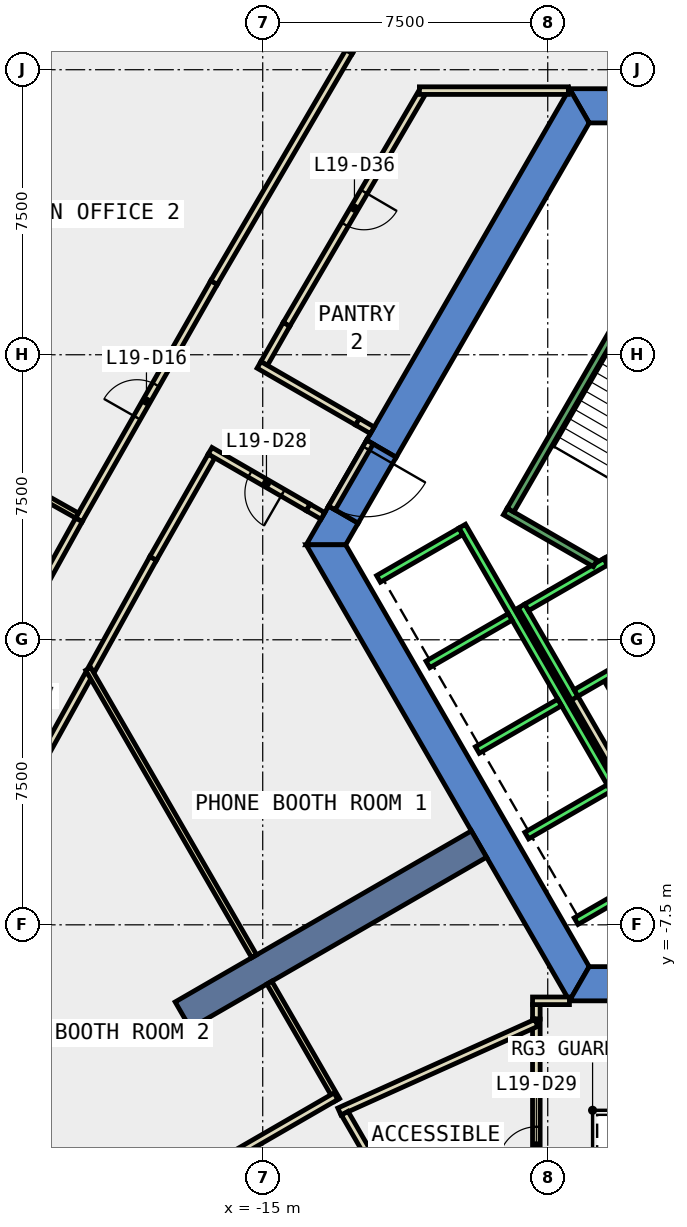
"""IFC4 building model, lengths in metres.
Left out: names, types, materials, properties, quantities, classifications, styles, units other than length and angle.
Written with IfcOpenShell. Run it as: python <this file> out.ifc"""

import sys

from ifc_helpers import new_model, si_unit, direction, frame, frame_2d, origin, place, context, subcontext, project, spatial, polyline, rectangle, outline, extrude, element, fill, save


model = new_model("IFC4")
c1 = context("Model", 3, precision=1e-05, world=origin(), true_north=direction((0.0, 1.0)))
c2 = subcontext(c1, "Body", "Model", "MODEL_VIEW")
j1 = project(units=[si_unit("LENGTHUNIT", "METRE"), si_unit("PLANEANGLEUNIT", "RADIAN")], contexts=[c1])
p1 = place(None, origin())
s1 = spatial("IfcSite", under=j1, at=p1, CompositionType="ELEMENT")
p2 = place(p1, origin())
s2 = spatial("IfcBuilding", under=s1, at=p2, CompositionType="ELEMENT")
p3 = place(p2, frame((0.0, 0.0, 90.8)))
s3 = spatial("IfcBuildingStorey", under=s2, at=p3, CompositionType="ELEMENT", Elevation=90.8)
p4 = place(p3, frame((0.0, 0.0, -0.4)))
e1 = element("IfcWall", 1, at=p4, inside=s3, PredefinedType="SHEAR", context=c2, shape_type="SweptSolid", body=[
    extrude(outline(polyline([(-4.55, 13.6), (-4.55, 14.5), (-6.928, 14.5), (-6.409, 13.6), (-4.55, 13.6)])), origin(), (0.0, 0.0, 1.0), 4.2),
])
p5 = place(p3, frame((0.0, 0.0, -0.4)))
e2 = element("IfcWall", 2, at=p5, inside=s3, PredefinedType="SHEAR", context=c2, shape_type="SweptSolid", body=[
    extrude(outline(polyline([(-12.267, 5.252), (-11.488, 4.802), (-6.409, 13.6), (-6.928, 14.5), (-12.267, 5.252)])), origin(), (0.0, 0.0, 1.0), 4.2),
])
p6 = place(p3, frame((0.0, 0.0, -0.4)))
e3 = element("IfcWall", 3, at=p6, inside=s3, PredefinedType="SHEAR", context=c2, shape_type="SweptSolid", body=[
    extrude(outline(polyline([(-12.488, 3.07), (-13.267, 3.52), (-13.856, 2.5), (-12.817, 2.5), (-12.488, 3.07)])), origin(), (0.0, 0.0, 1.0), 4.2),
])
p7 = place(p3, frame((0.0, 0.0, 3.6)))
e4 = element("IfcWall", 4, at=p7, inside=s3, PredefinedType="SHEAR", context=c2, shape_type="SweptSolid", body=[
    extrude(outline(polyline([(-13.267, 3.52), (-12.488, 3.07), (-11.488, 4.802), (-12.267, 5.252), (-13.267, 3.52)])), origin(), (0.0, 0.0, 1.0), 0.2),
])
p8 = place(p3, frame((0.0, 0.0, -0.4)))
e5 = element("IfcWall", 5, at=p8, inside=s3, PredefinedType="SHEAR", context=c2, shape_type="SweptSolid", body=[
    extrude(outline(polyline([(-13.856, 2.5), (-6.928, -9.5), (-6.409, -8.6), (-12.817, 2.5), (-13.856, 2.5)])), origin(), (0.0, 0.0, 1.0), 4.2),
])
p9 = place(p3, frame((0.0, 0.0, -0.4)))
e6 = element("IfcWall", 6, at=p9, inside=s3, PredefinedType="SHEAR", context=c2, shape_type="SweptSolid", body=[
    extrude(outline(polyline([(3.75, -9.5), (3.75, -8.6), (-6.409, -8.6), (-6.928, -9.5), (3.75, -9.5)])), origin(), (0.0, 0.0, 1.0), 4.2),
])
p10 = place(p3, frame((-9.31, -5.375, -0.4), z_axis=(0.0, 0.0, 1.0), x_axis=(-0.866017533419, -0.500013631625, 0.0)))
e7 = element("IfcWall", 7, at=p10, inside=s3, PredefinedType="SHEAR", context=c2, shape_type="SweptSolid", body=[
    extrude(rectangle(XDim=9.0, YDim=0.8, at=frame_2d((4.5, 0.0))), origin(), (0.0, 0.0, 1.0), 4.2),
])
p11 = place(p3, frame((-19.289, 18.813, 0.0), z_axis=(0.0, 0.0, 1.0), x_axis=(-0.504998117261, -0.863120444413, 0.0)))
e8 = element("IfcWall", 8, at=p11, inside=s3, PredefinedType="STANDARD", context=c2, shape_type="SweptSolid", body=[
    extrude(rectangle(XDim=6.099, YDim=0.3, at=frame_2d((3.049, 0.0))), origin(), (0.0, 0.0, 1.0), 3.8),
])
p12 = place(p11, frame((0.525, 0.0, 0.9)))
e9 = element("IfcOpeningElement", 9, at=p12, cuts=e8, PredefinedType="OPENING", context=c2, shape_type="SweptSolid", body=[
    extrude(rectangle(XDim=2.0, YDim=2.6, at=frame_2d((1.0, 1.3))), frame((0.0, 0.16, 0.0), z_axis=(0.0, -1.0, 0.0), x_axis=(1.0, 0.0, 0.0)), (0.0, 0.0, 1.0), 0.32),
])
p13 = place(p11, frame((3.574, 0.0, 0.9)))
e10 = element("IfcOpeningElement", 10, at=p13, cuts=e8, PredefinedType="OPENING", context=c2, shape_type="SweptSolid", body=[
    extrude(rectangle(XDim=2.0, YDim=2.6, at=frame_2d((1.0, 1.3))), frame((0.0, 0.16, 0.0), z_axis=(0.0, -1.0, 0.0), x_axis=(1.0, 0.0, 0.0)), (0.0, 0.0, 1.0), 0.32),
])
p14 = place(p3, frame((-10.797, 14.415, 0.0), z_axis=(0.0, 0.0, 1.0), x_axis=(-0.505008297342, -0.863114488128, 0.0)))
e11 = element("IfcWall", 11, at=p14, inside=s3, PredefinedType="PARTITIONING", context=c2, shape_type="SweptSolid", body=[
    extrude(rectangle(XDim=7.085, YDim=0.2, at=frame_2d((3.542, 0.0))), origin(), (0.0, 0.0, 1.0), 3.8),
])
p15 = place(p14, frame((3.043, 0.0, 0.0)))
e12 = element("IfcOpeningElement", 12, at=p15, cuts=e11, PredefinedType="OPENING", context=c2, shape_type="SweptSolid", body=[
    extrude(rectangle(XDim=1.0, YDim=2.1, at=frame_2d((0.5, 1.05))), frame((0.0, 0.11, 0.0), z_axis=(0.0, -1.0, 0.0), x_axis=(1.0, 0.0, 0.0)), (0.0, 0.0, 1.0), 0.22),
])
p16 = place(p3, frame((-14.375, 8.3, 0.0), z_axis=(0.0, 0.0, 1.0), x_axis=(-0.495074026382, -0.868850797549, 0.0)))
e13 = element("IfcWall", 13, at=p16, inside=s3, PredefinedType="PARTITIONING", context=c2, shape_type="SweptSolid", body=[
    extrude(rectangle(XDim=1.186, YDim=0.2, at=frame_2d((0.593, 0.0))), origin(), (0.0, 0.0, 1.0), 3.8),
])
p17 = place(p3, frame((-15.098, 7.233, 0.0), z_axis=(0.0, 0.0, 1.0), x_axis=(0.866101363304, -0.499868411168, 0.0)))
e14 = element("IfcWall", 14, at=p17, inside=s3, PredefinedType="PARTITIONING", context=c2, shape_type="SweptSolid", body=[
    extrude(rectangle(XDim=2.992, YDim=0.2, at=frame_2d((1.496, 0.0))), origin(), (0.0, 0.0, 1.0), 3.8),
])
p18 = place(p3, frame((-17.883, 2.143, 0.0), z_axis=(0.0, 0.0, 1.0), x_axis=(-0.484695523805, -0.874682942101, 0.0)))
e15 = element("IfcWall", 15, at=p18, inside=s3, PredefinedType="PARTITIONING", context=c2, shape_type="SweptSolid", body=[
    extrude(rectangle(XDim=3.349, YDim=0.2, at=frame_2d((1.674, 0.0))), origin(), (0.0, 0.0, 1.0), 3.8),
])
p19 = place(p3, frame((-13.417, 3.26, 0.0), z_axis=(0.0, 0.0, 1.0), x_axis=(-0.866032067792, 0.499988457423, 0.0)))
e16 = element("IfcWall", 16, at=p19, inside=s3, PredefinedType="PARTITIONING", context=c2, shape_type="SweptSolid", body=[
    extrude(rectangle(XDim=0.45, YDim=0.2, at=frame_2d((0.225, 0.0))), origin(), (0.0, 0.0, 1.0), 2.4),
])
p20 = place(p3, frame((-16.348, 4.837, 0.0), z_axis=(0.0, 0.0, 1.0), x_axis=(-0.495121026513, -0.868824015037, 0.0)))
e17 = element("IfcWall", 17, at=p20, inside=s3, PredefinedType="PARTITIONING", context=c2, shape_type="SweptSolid", body=[
    extrude(rectangle(XDim=3.101, YDim=0.2, at=frame_2d((1.55, 0.0))), origin(), (0.0, 0.0, 1.0), 3.8),
])
p21 = place(p3, frame((-19.579, -0.917, 0.0), z_axis=(0.0, 0.0, 1.0), x_axis=(-0.484700239797, -0.874680328772, 0.0)))
e18 = element("IfcWall", 18, at=p21, inside=s3, PredefinedType="PARTITIONING", context=c2, shape_type="SweptSolid", body=[
    extrude(rectangle(XDim=3.585, YDim=0.2, at=frame_2d((1.792, 0.0))), origin(), (0.0, 0.0, 1.0), 3.8),
])
p22 = place(p3, frame((-12.728, 15.473, 0.0), z_axis=(0.0, 0.0, 1.0), x_axis=(0.515010673306, 0.857183764651, 0.0)))
e19 = element("IfcWall", 19, at=p22, inside=s3, PredefinedType="PARTITIONING", context=c2, shape_type="SweptSolid", body=[
    extrude(rectangle(XDim=7.111, YDim=0.2, at=frame_2d((3.555, 0.0))), origin(), (0.0, 0.0, 1.0), 3.8),
])
p23 = place(p22, frame((3.13, 0.0, 0.0)))
e20 = element("IfcOpeningElement", 20, at=p23, cuts=e19, PredefinedType="OPENING", context=c2, shape_type="SweptSolid", body=[
    extrude(rectangle(XDim=1.0, YDim=2.1, at=frame_2d((0.5, 1.05))), frame((0.0, 0.11, 0.0), z_axis=(0.0, -1.0, 0.0), x_axis=(1.0, 0.0, 0.0)), (0.0, 0.0, 1.0), 0.22),
])
p24 = place(p3, frame((-19.838, 3.156, 0.0), z_axis=(0.0, 0.0, 1.0), x_axis=(0.494978648769, 0.868905137091, 0.0)))
e21 = element("IfcWall", 21, at=p24, inside=s3, PredefinedType="PARTITIONING", context=c2, shape_type="SweptSolid", body=[
    extrude(rectangle(XDim=7.186, YDim=0.2, at=frame_2d((3.593, 0.0))), origin(), (0.0, 0.0, 1.0), 3.8),
])
p25 = place(p24, frame((3.093, 0.0, 0.0)))
e22 = element("IfcOpeningElement", 22, at=p25, cuts=e21, PredefinedType="OPENING", context=c2, shape_type="SweptSolid", body=[
    extrude(rectangle(XDim=1.0, YDim=2.1, at=frame_2d((0.5, 1.05))), frame((0.0, 0.11, 0.0), z_axis=(0.0, -1.0, 0.0), x_axis=(1.0, 0.0, 0.0)), (0.0, 0.0, 1.0), 0.22),
])
p26 = place(p3, frame((-16.281, 9.4, 0.0), z_axis=(0.0, 0.0, 1.0), x_axis=(0.504973069247, 0.863135099121, 0.0)))
e23 = element("IfcWall", 23, at=p26, inside=s3, PredefinedType="PARTITIONING", context=c2, shape_type="SweptSolid", body=[
    extrude(rectangle(XDim=7.036, YDim=0.2, at=frame_2d((3.518, 0.0))), origin(), (0.0, 0.0, 1.0), 3.8),
])
p27 = place(p3, frame((-23.284, -3.064, 0.0), z_axis=(0.0, 0.0, 1.0), x_axis=(0.48478560119, 0.874633020689, 0.0)))
e24 = element("IfcWall", 24, at=p27, inside=s3, PredefinedType="PARTITIONING", context=c2, shape_type="SweptSolid", body=[
    extrude(rectangle(XDim=7.11, YDim=0.2, at=frame_2d((3.555, 0.0))), origin(), (0.0, 0.0, 1.0), 3.8),
])
p28 = place(p27, frame((3.13, 0.0, 0.0)))
e25 = element("IfcOpeningElement", 25, at=p28, cuts=e24, PredefinedType="OPENING", context=c2, shape_type="SweptSolid", body=[
    extrude(rectangle(XDim=1.0, YDim=2.1, at=frame_2d((0.5, 1.05))), frame((0.0, 0.11, 0.0), z_axis=(0.0, -1.0, 0.0), x_axis=(1.0, 0.0, 0.0)), (0.0, 0.0, 1.0), 0.22),
])
p29 = place(p3, frame((-5.126, -2.422, 0.0), z_axis=(0.0, 0.0, 1.0), x_axis=(-0.500062241894, 0.865989465428, 0.0)))
e26 = element("IfcWall", 26, at=p29, inside=s3, PredefinedType="PARTITIONING", context=c2, shape_type="SweptSolid", body=[
    extrude(rectangle(XDim=1.7, YDim=0.2, at=frame_2d((0.85, 0.0))), origin(), (0.0, 0.0, 1.0), 3.8),
])
p30 = place(p3, frame((-5.492, -3.788, 0.0), z_axis=(0.0, 0.0, 1.0), x_axis=(-0.500008949224, 0.866020236886, 0.0)))
e27 = element("IfcWall", 27, at=p30, inside=s3, PredefinedType="PARTITIONING", context=c2, shape_type="SweptSolid", body=[
    extrude(rectangle(XDim=2.68, YDim=0.2, at=frame_2d((1.34, 0.0))), origin(), (0.0, 0.0, 1.0), 3.8),
])
p31 = place(p3, frame((-7.8, -9.98, 0.0), z_axis=(0.0, 0.0, 1.0), x_axis=(0.0, 1.0, 0.0)))
e28 = element("IfcWall", 28, at=p31, inside=s3, PredefinedType="PARTITIONING", context=c2, shape_type="SweptSolid", body=[
    extrude(rectangle(XDim=0.381, YDim=0.2, at=frame_2d((0.19, 0.0))), origin(), (0.0, 0.0, 1.0), 3.8),
])
p32 = place(p3, frame((-7.9, -9.499, 0.0), z_axis=(0.0, 0.0, 1.0), x_axis=(1.0, 0.0, 0.0)))
e29 = element("IfcWall", 29, at=p32, inside=s3, PredefinedType="PARTITIONING", context=c2, shape_type="SweptSolid", body=[
    extrude(rectangle(XDim=0.971, YDim=0.2, at=frame_2d((0.485, 0.0))), origin(), (0.0, 0.0, 1.0), 3.8),
])
p33 = place(p3, frame((-7.8, -16.649, 0.0), z_axis=(0.0, 0.0, 1.0), x_axis=(0.0, 1.0, 0.0)))
e30 = element("IfcWall", 30, at=p33, inside=s3, PredefinedType="PARTITIONING", context=c2, shape_type="SweptSolid", body=[
    extrude(rectangle(XDim=6.669, YDim=0.2, at=frame_2d((3.334, 0.0))), origin(), (0.0, 0.0, 1.0), 3.8),
])
p34 = place(p33, frame((2.835, 0.0, 0.0)))
e31 = element("IfcOpeningElement", 31, at=p34, cuts=e30, PredefinedType="OPENING", context=c2, shape_type="SweptSolid", body=[
    extrude(rectangle(XDim=1.0, YDim=2.1, at=frame_2d((0.5, 1.05))), frame((0.0, 0.11, 0.0), z_axis=(0.0, -1.0, 0.0), x_axis=(1.0, 0.0, 0.0)), (0.0, 0.0, 1.0), 0.22),
])
p35 = place(p3, frame((-6.957, 14.45, 0.0), z_axis=(0.0, 0.0, 1.0), x_axis=(-1.0, 0.0, 0.0)))
e32 = element("IfcWall", 32, at=p35, inside=s3, PredefinedType="PARTITIONING", context=c2, shape_type="SweptSolid", body=[
    extrude(rectangle(XDim=3.92, YDim=0.2, at=frame_2d((1.96, 0.0))), origin(), (0.0, 0.0, 1.0), 3.8),
])
p36 = place(p3, frame((-7.8, -10.08, 0.0), z_axis=(0.0, 0.0, 1.0), x_axis=(-0.911938383636, -0.410327167577, 0.0)))
e33 = element("IfcWall", 33, at=p36, inside=s3, PredefinedType="PARTITIONING", context=c2, shape_type="SweptSolid", body=[
    extrude(rectangle(XDim=5.683, YDim=0.2, at=frame_2d((2.842, 0.0))), origin(), (0.0, 0.0, 1.0), 3.8),
])
p37 = place(p3, frame((-13.043, -12.108, 0.0), z_axis=(0.0, 0.0, 1.0), x_axis=(-0.499947764329, 0.866055559963, 0.0)))
e34 = element("IfcWall", 34, at=p37, inside=s3, PredefinedType="PARTITIONING", context=c2, shape_type="SweptSolid", body=[
    extrude(rectangle(XDim=3.564, YDim=0.15, at=frame_2d((1.782, 0.0))), origin(), (0.0, 0.0, 1.0), 3.8),
])
p38 = place(p3, frame((-10.458, -16.586, 0.0), z_axis=(0.0, 0.0, 1.0), x_axis=(-0.500121439648, 0.865955279218, 0.0)))
e35 = element("IfcWall", 35, at=p38, inside=s3, PredefinedType="PARTITIONING", context=c2, shape_type="SweptSolid", body=[
    extrude(rectangle(XDim=4.767, YDim=0.2, at=frame_2d((2.383, 0.0))), origin(), (0.0, 0.0, 1.0), 3.8),
])
p39 = place(p3, frame((-13.072, -12.009, 0.0), z_axis=(0.0, 0.0, 1.0), x_axis=(-0.865993734772, -0.500054848326, 0.0)))
e36 = element("IfcWall", 36, at=p39, inside=s3, PredefinedType="PARTITIONING", context=c2, shape_type="SweptSolid", body=[
    extrude(rectangle(XDim=8.583, YDim=0.2, at=frame_2d((4.292, 0.0))), origin(), (0.0, 0.0, 1.0), 3.8),
])
p40 = place(p3, frame((-19.888, 3.27, 0.0), z_axis=(0.0, 0.0, 1.0), x_axis=(-0.871789386467, 0.489880868828, 0.0)))
e37 = element("IfcWall", 37, at=p40, inside=s3, PredefinedType="PARTITIONING", context=c2, shape_type="SweptSolid", body=[
    extrude(rectangle(XDim=5.73, YDim=0.15, at=frame_2d((2.865, 0.0))), origin(), (0.0, 0.0, 1.0), 3.8),
])
p41 = place(p3, frame((-12.18, 5.202, 0.0), z_axis=(0.0, 0.0, 1.0), x_axis=(-0.50002537861, -0.866010750942, 0.0)))
e38 = element("IfcWall", 38, at=p41, inside=s3, PredefinedType="PARTITIONING", context=c2, shape_type="SweptSolid", body=[
    extrude(rectangle(XDim=2.0, YDim=0.2, at=frame_2d((1.0, 0.0))), origin(), (0.0, 0.0, 1.0), 2.4),
])
p42 = place(p41, frame((0.19, 0.0, 0.0)))
e39 = element("IfcOpeningElement", 39, at=p42, cuts=e38, PredefinedType="OPENING", context=c2, shape_type="SweptSolid", body=[
    extrude(rectangle(XDim=1.8, YDim=2.1, at=frame_2d((0.9, 1.05))), frame((0.0, 0.11, 0.0), z_axis=(0.0, -1.0, 0.0), x_axis=(1.0, 0.0, 0.0)), (0.0, 0.0, 1.0), 0.22),
])
p43 = place(p3, frame((-15.225, -8.328, 0.0), z_axis=(0.0, 0.0, 1.0), x_axis=(-0.500038648455, 0.866003088939, 0.0)))
e40 = element("IfcWall", 40, at=p43, inside=s3, PredefinedType="PARTITIONING", context=c2, shape_type="SweptSolid", body=[
    extrude(rectangle(XDim=8.733, YDim=0.15, at=frame_2d((4.367, 0.0))), origin(), (0.0, 0.0, 1.0), 3.8),
])
p44 = place(p3, frame((-12.506, 5.737, 0.0), z_axis=(0.0, 0.0, 1.0), x_axis=(0.865624510465, -0.500693725627, 0.0)))
e41 = element("IfcWall", 41, at=p44, inside=s3, PredefinedType="PARTITIONING", context=c2, shape_type="SweptSolid", body=[
    extrude(rectangle(XDim=0.449, YDim=0.2, at=frame_2d((0.225, 0.0))), origin(), (0.0, 0.0, 1.0), 2.4),
])
p45 = place(p3, frame((-13.807, 3.485, 0.0), z_axis=(0.0, 0.0, 1.0), x_axis=(-0.865947944451, 0.500134139508, 0.0)))
e42 = element("IfcWall", 42, at=p45, inside=s3, PredefinedType="PARTITIONING", context=c2, shape_type="SweptSolid", body=[
    extrude(rectangle(XDim=2.977, YDim=0.2, at=frame_2d((1.489, 0.0))), origin(), (0.0, 0.0, 1.0), 3.8),
])
p46 = place(p45, frame((0.764, 0.0, 0.0)))
e43 = element("IfcOpeningElement", 43, at=p46, cuts=e42, PredefinedType="OPENING", context=c2, shape_type="SweptSolid", body=[
    extrude(rectangle(XDim=1.0, YDim=2.1, at=frame_2d((0.5, 1.05))), frame((0.0, 0.11, 0.0), z_axis=(0.0, -1.0, 0.0), x_axis=(1.0, 0.0, 0.0)), (0.0, 0.0, 1.0), 0.22),
])
p47 = place(p3, frame((-5.94, 2.188, 0.0), z_axis=(0.0, 0.0, 1.0), x_axis=(0.49994636267, -0.866056369097, 0.0)))
e44 = element("IfcWall", 44, at=p47, inside=s3, PredefinedType="STANDARD", context=c2, shape_type="SweptSolid", body=[
    extrude(rectangle(XDim=2.8, YDim=0.2, at=frame_2d((1.4, 0.0))), origin(), (0.0, 0.0, 1.0), 3.8),
])
p48 = place(p47, frame((1.225, 0.0, 0.0)))
e45 = element("IfcOpeningElement", 45, at=p48, cuts=e44, PredefinedType="OPENING", context=c2, shape_type="SweptSolid", body=[
    extrude(rectangle(XDim=1.1, YDim=2.1, at=frame_2d((0.55, 1.05))), frame((0.0, 0.11, 0.0), z_axis=(0.0, -1.0, 0.0), x_axis=(1.0, 0.0, 0.0)), (0.0, 0.0, 1.0), 0.22),
])
p49 = place(p3, frame((-8.192, 0.888, 0.0), z_axis=(0.0, 0.0, 1.0), x_axis=(0.49994636267, -0.866056369097, 0.0)))
e46 = element("IfcWall", 46, at=p49, inside=s3, PredefinedType="STANDARD", context=c2, shape_type="SweptSolid", body=[
    extrude(rectangle(XDim=2.8, YDim=0.2, at=frame_2d((1.4, 0.0))), origin(), (0.0, 0.0, 1.0), 3.8),
])
for number, where, z_axis, x_axis in (
    (47, (-5.977, 2.052, 0.0), (0.0, 0.0, 1.0), (-0.866, -0.5, 0.0)),
    (48, (-4.677, -0.2, 0.0), (0.0, 0.0, 1.0), (-0.866, -0.5, 0.0)),
):
    element("IfcWall", number, at=place(p3, frame(where, z_axis=z_axis, x_axis=x_axis)), inside=s3, PredefinedType="STANDARD", context=c2, shape_type="SweptSolid", body=[
        extrude(rectangle(XDim=2.399, YDim=0.2, at=frame_2d((1.2, 0.0))), origin(), (0.0, 0.0, 1.0), 3.8),
    ])
p50 = place(p3, frame((-9.751, 2.99, 0.0), z_axis=(0.0, 0.0, 1.0), x_axis=(0.50000090737, -0.866024879913, 0.0)))
e49 = element("IfcWall", 49, at=p50, inside=s3, PredefinedType="STANDARD", context=c2, shape_type="SweptSolid", body=[
    extrude(rectangle(XDim=10.6, YDim=0.2, at=frame_2d((5.3, 0.0))), origin(), (0.0, 0.0, 1.0), 3.8),
])
p51 = place(p3, frame((-9.788, 2.853, 0.0), z_axis=(0.0, 0.0, 1.0), x_axis=(-0.865998541277, -0.500046524342, 0.0)))
e50 = element("IfcWall", 50, at=p51, inside=s3, PredefinedType="STANDARD", context=c2, shape_type="SweptSolid", body=[
    extrude(rectangle(XDim=2.5, YDim=0.2, at=frame_2d((1.25, 0.0))), origin(), (0.0, 0.0, 1.0), 3.8),
])
for number, where, z_axis, x_axis in (
    (51, (-8.488, 0.602, 0.0), (0.0, 0.0, 1.0), (-0.866, -0.5, 0.0)),
    (52, (-7.188, -1.65, 0.0), (0.0, 0.0, 1.0), (-0.866, -0.5, 0.0)),
    (53, (-5.888, -3.902, 0.0), (0.0, 0.0, 1.0), (-0.866, -0.5, 0.0)),
    (54, (-4.588, -6.153, 0.0), (0.0, 0.0, 1.0), (-0.866, -0.5, 0.0)),
):
    element("IfcWall", number, at=place(p3, frame(where, z_axis=z_axis, x_axis=x_axis)), inside=s3, PredefinedType="STANDARD", context=c2, shape_type="SweptSolid", body=[
        extrude(rectangle(XDim=2.5, YDim=0.2, at=frame_2d((1.25, 0.0))), origin(), (0.0, 0.0, 1.0), 3.8),
    ])
p52 = place(p3, frame((-6.25, 2.01, 0.0), z_axis=(0.0, 0.0, 1.0), x_axis=(-0.86611865017, 0.499838457731, 0.0)))
e55 = element("IfcWall", 55, at=p52, inside=s3, PredefinedType="STANDARD", context=c2, shape_type="SweptSolid", body=[
    extrude(rectangle(XDim=2.733, YDim=0.2, at=frame_2d((1.366, 0.0))), origin(), (0.0, 0.0, 1.0), 3.8),
])
p53 = place(p3, frame((-5.03, 9.388, 0.0), z_axis=(0.0, 0.0, 1.0), x_axis=(-0.499978703459, -0.866037698999, 0.0)))
e56 = element("IfcWall", 56, at=p53, inside=s3, PredefinedType="STANDARD", context=c2, shape_type="SweptSolid", body=[
    extrude(rectangle(XDim=6.9, YDim=0.2, at=frame_2d((3.45, 0.0))), origin(), (0.0, 0.0, 1.0), 3.8),
])
p54 = place(p25, origin())
e57 = element("IfcDoor", 57, at=p54, inside=s3, OperationType="SINGLE_SWING_LEFT", PredefinedType="DOOR", context=c2, shape_type="SweptSolid", body=[
    extrude(rectangle(XDim=1.0, YDim=2.1, at=frame_2d((0.5, 1.05))), frame((0.0, 0.025, 0.0), z_axis=(0.0, -1.0, 0.0), x_axis=(1.0, 0.0, 0.0)), (0.0, 0.0, 1.0), 0.05),
])
fill(e22, e57)
p55 = place(p46, origin())
e58 = element("IfcDoor", 58, at=p55, inside=s3, OperationType="SINGLE_SWING_LEFT", PredefinedType="DOOR", context=c2, shape_type="SweptSolid", body=[
    extrude(rectangle(XDim=1.0, YDim=2.1, at=frame_2d((0.5, 1.05))), frame((0.0, 0.025, 0.0), z_axis=(0.0, -1.0, 0.0), x_axis=(1.0, 0.0, 0.0)), (0.0, 0.0, 1.0), 0.05),
])
fill(e43, e58)
p56 = place(p34, origin())
e59 = element("IfcDoor", 59, at=p56, inside=s3, OperationType="SINGLE_SWING_LEFT", PredefinedType="DOOR", context=c2, shape_type="SweptSolid", body=[
    extrude(rectangle(XDim=1.0, YDim=2.1, at=frame_2d((0.5, 1.05))), frame((0.0, 0.025, 0.0), z_axis=(0.0, -1.0, 0.0), x_axis=(1.0, 0.0, 0.0)), (0.0, 0.0, 1.0), 0.05),
])
fill(e31, e59)
p57 = place(p15, origin())
e60 = element("IfcDoor", 60, at=p57, inside=s3, OperationType="SINGLE_SWING_LEFT", PredefinedType="DOOR", context=c2, shape_type="SweptSolid", body=[
    extrude(rectangle(XDim=1.0, YDim=2.1, at=frame_2d((0.5, 1.05))), frame((0.0, 0.025, 0.0), z_axis=(0.0, -1.0, 0.0), x_axis=(1.0, 0.0, 0.0)), (0.0, 0.0, 1.0), 0.05),
])
fill(e12, e60)
p58 = place(p42, origin())
e61 = element("IfcDoor", 61, at=p58, inside=s3, OperationType="DOUBLE_DOOR_SINGLE_SWING", PredefinedType="DOOR", context=c2, shape_type="SweptSolid", body=[
    extrude(rectangle(XDim=1.8, YDim=2.1, at=frame_2d((0.9, 1.05))), frame((0.0, 0.025, 0.0), z_axis=(0.0, -1.0, 0.0), x_axis=(1.0, 0.0, 0.0)), (0.0, 0.0, 1.0), 0.05),
])
fill(e39, e61)
save(model, sys.argv[1])
